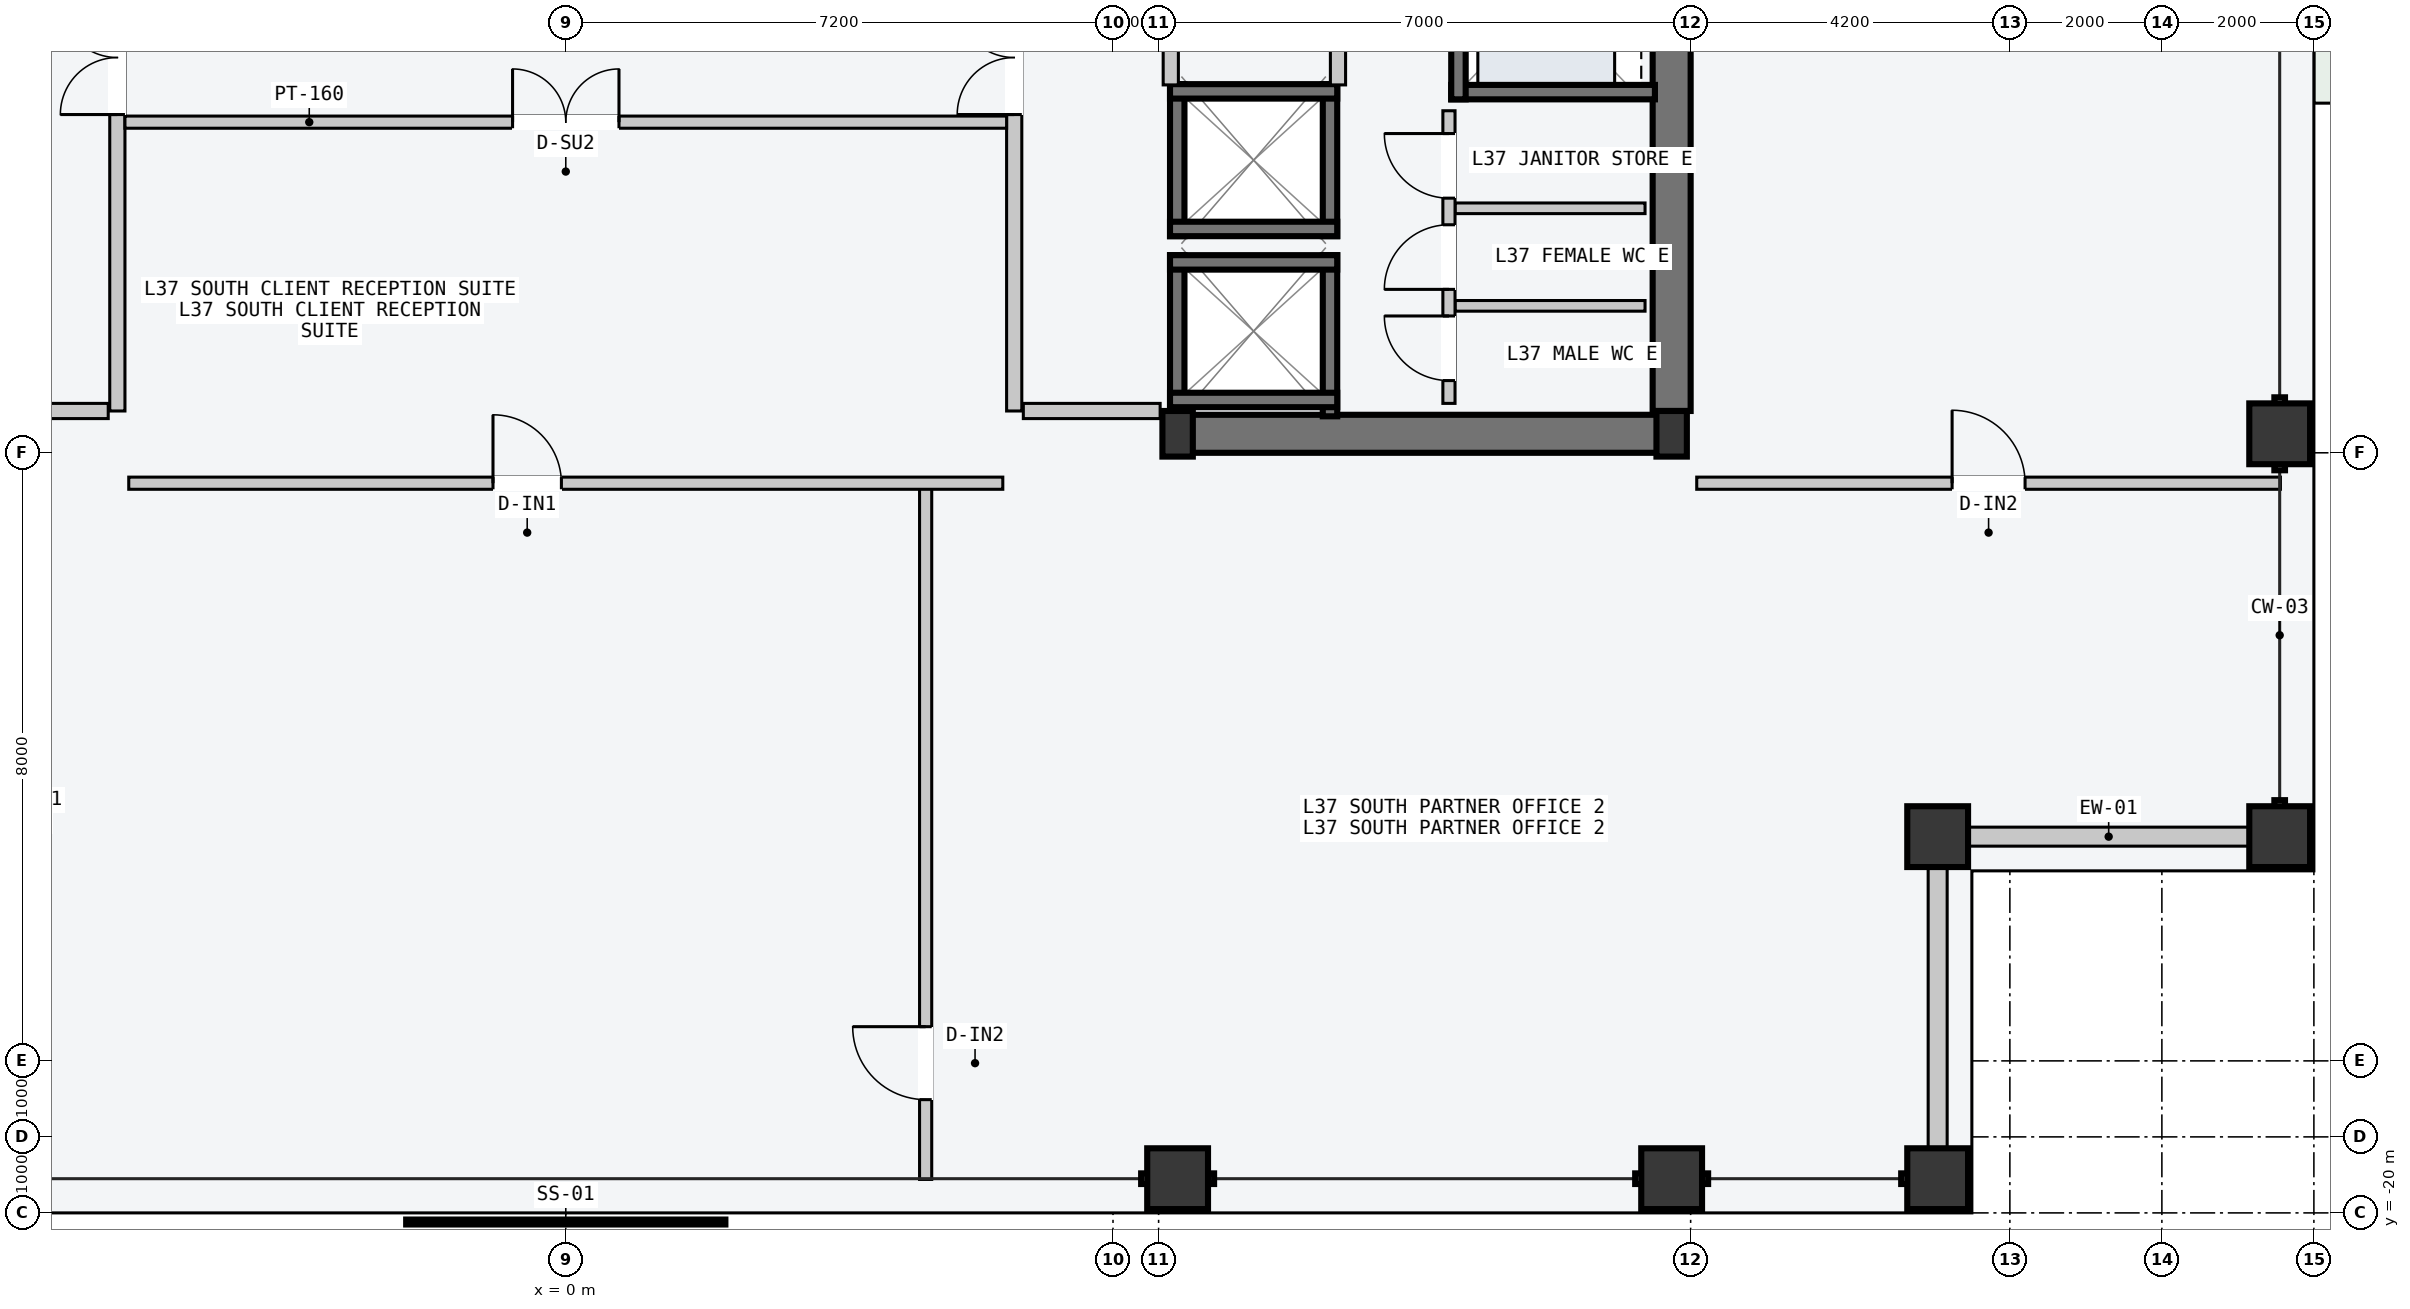
"""IFC4 building model, lengths in metres.
Left out: names, types, materials, properties, quantities, classifications, styles, units other than length and angle.
Written with IfcOpenShell. Run it as: python <this file> out.ifc"""

import sys

from ifc_helpers import new_model, si_unit, direction, frame, frame_2d, origin, origin_2d, place, context, subcontext, project, spatial, rectangle, hollow_rectangle, i_section, extrude, element, fill, save


model = new_model("IFC4")
c1 = context("Model", 3, precision=1e-05, world=origin(), true_north=direction((0.0, 1.0)))
c2 = subcontext(c1, "Body", "Model", "MODEL_VIEW")
j1 = project(units=[si_unit("LENGTHUNIT", "METRE"), si_unit("PLANEANGLEUNIT", "RADIAN")], contexts=[c1])
p1 = place(None, origin())
s1 = spatial("IfcSite", under=j1, at=p1, CompositionType="ELEMENT")
p2 = place(p1, origin())
s2 = spatial("IfcBuilding", under=s1, at=p2, CompositionType="ELEMENT")
p3 = place(p2, frame((0.0, 0.0, 142.2)))
s3 = spatial("IfcBuildingStorey", under=s2, at=p3, CompositionType="ELEMENT", Elevation=142.2)
p4 = place(p3, frame((8.07, -9.75, -0.2), z_axis=(0.0, 0.0, 1.0), x_axis=(1.0, 0.0, 0.0)))
e1 = element("IfcWall", 1, at=p4, inside=s3, PredefinedType="SHEAR", context=c2, shape_type="SweptSolid", body=[
    extrude(rectangle(XDim=6.46, YDim=0.5, at=frame_2d((3.23, 0.0))), origin(), (0.0, 0.0, 1.0), 3.6),
])
p5 = place(p3, frame((14.55, -9.45, -0.2), z_axis=(0.0, 0.0, 1.0), x_axis=(0.0, 1.0, 0.0)))
e2 = element("IfcWall", 2, at=p5, inside=s3, PredefinedType="SHEAR", context=c2, shape_type="SweptSolid", body=[
    extrude(rectangle(XDim=9.15, YDim=0.5, at=frame_2d((4.575, 0.0))), origin(), (0.0, 0.0, 1.0), 3.6),
])
for number, where, z_axis, x_axis in (
    (3, (8.05, -9.75, 0.0), (0.0, 0.0, 1.0), (1.0, 0.0, 0.0)),
    (4, (14.55, -9.75, 0.0), (0.0, 0.0, 1.0), (1.0, 0.0, 0.0)),
):
    element("IfcColumn", number, at=place(p3, frame(where, z_axis=z_axis, x_axis=x_axis)), inside=s3, PredefinedType="COLUMN", context=c2, shape_type="SweptSolid", body=[
        extrude(i_section(OverallWidth=0.4, OverallDepth=0.6, WebThickness=0.022, FlangeThickness=0.036, at=origin_2d()), origin(), (0.0, 0.0, 1.0), 3.6),
    ])
for number, where, z_axis, x_axis in (
    (5, (8.05, -19.55, 0.0), (0.0, 0.0, 1.0), (1.0, 0.0, 0.0)),
    (6, (14.55, -19.55, 0.0), (0.0, 0.0, 1.0), (1.0, 0.0, 0.0)),
    (7, (18.05, -19.55, 0.0), (0.0, 0.0, 1.0), (1.0, 0.0, 0.0)),
    (8, (22.55, -15.05, 0.0), (0.0, 0.0, 1.0), (0.0, 1.0, 0.0)),
    (9, (22.55, -9.75, 0.0), (0.0, 0.0, 1.0), (0.0, 1.0, 0.0)),
    (10, (18.05, -15.05, 0.0), (0.0, 0.0, 1.0), (1.0, 0.0, 0.0)),
):
    element("IfcColumn", number, at=place(p3, frame(where, z_axis=z_axis, x_axis=x_axis)), inside=s3, PredefinedType="COLUMN", context=c2, shape_type="SweptSolid", body=[
        extrude(hollow_rectangle(XDim=0.8, YDim=0.8, WallThickness=0.036, at=origin_2d()), origin(), (0.0, 0.0, 1.0), 3.6),
    ])
for number, where, z_axis, x_axis in (
    (11, (18.46, -15.05, 0.0), (0.0, 0.0, 1.0), (1.0, 0.0, 0.0)),
    (12, (18.05, -19.14, 0.0), (0.0, 0.0, 1.0), (0.0, 1.0, 0.0)),
):
    element("IfcWall", number, at=place(p3, frame(where, z_axis=z_axis, x_axis=x_axis)), inside=s3, PredefinedType="STANDARD", context=c2, shape_type="SweptSolid", body=[
        extrude(rectangle(XDim=3.68, YDim=0.25, at=frame_2d((1.84, 0.0))), origin(), (0.0, 0.0, 1.0), 2.75),
    ])
for number, where, z_axis, x_axis in (
    (13, (8.045, -9.52, -0.2), (0.0, 0.0, 1.0), (0.0, 1.0, 0.0)),
    (14, (10.055, -9.52, -0.2), (0.0, 0.0, 1.0), (0.0, 1.0, 0.0)),
):
    element("IfcWall", number, at=place(p3, frame(where, z_axis=z_axis, x_axis=x_axis)), inside=s3, PredefinedType="SOLIDWALL", context=c2, shape_type="SweptSolid", body=[
        extrude(rectangle(XDim=2.12, YDim=0.19, at=frame_2d((1.06, 0.0))), origin(), (0.0, 0.0, 1.0), 3.6),
    ])
for number, where, z_axis, x_axis in (
    (15, (7.95, -7.495, -0.2), (0.0, 0.0, 1.0), (1.0, 0.0, 0.0)),
    (16, (7.95, -9.305, -0.2), (0.0, 0.0, 1.0), (1.0, 0.0, 0.0)),
):
    element("IfcWall", number, at=place(p3, frame(where, z_axis=z_axis, x_axis=x_axis)), inside=s3, PredefinedType="SOLIDWALL", context=c2, shape_type="SweptSolid", body=[
        extrude(rectangle(XDim=2.2, YDim=0.19, at=frame_2d((1.1, 0.0))), origin(), (0.0, 0.0, 1.0), 3.6),
    ])
for number, where, z_axis, x_axis in (
    (17, (8.045, -7.15, -0.2), (0.0, 0.0, 1.0), (0.0, 1.0, 0.0)),
    (18, (10.055, -7.15, -0.2), (0.0, 0.0, 1.0), (0.0, 1.0, 0.0)),
):
    element("IfcWall", number, at=place(p3, frame(where, z_axis=z_axis, x_axis=x_axis)), inside=s3, PredefinedType="SOLIDWALL", context=c2, shape_type="SweptSolid", body=[
        extrude(rectangle(XDim=2.0, YDim=0.19, at=frame_2d((1.0, 0.0))), origin(), (0.0, 0.0, 1.0), 3.6),
    ])
for number, where, z_axis, x_axis in (
    (19, (7.95, -5.245, -0.2), (0.0, 0.0, 1.0), (1.0, 0.0, 0.0)),
    (20, (7.95, -7.055, -0.2), (0.0, 0.0, 1.0), (1.0, 0.0, 0.0)),
):
    element("IfcWall", number, at=place(p3, frame(where, z_axis=z_axis, x_axis=x_axis)), inside=s3, PredefinedType="SOLIDWALL", context=c2, shape_type="SweptSolid", body=[
        extrude(rectangle(XDim=2.2, YDim=0.19, at=frame_2d((1.1, 0.0))), origin(), (0.0, 0.0, 1.0), 3.6),
    ])
p6 = place(p3, frame((11.65, -5.255, -0.2), z_axis=(0.0, 0.0, 1.0), x_axis=(1.0, 0.0, 0.0)))
e21 = element("IfcWall", 21, at=p6, inside=s3, PredefinedType="SOLIDWALL", context=c2, shape_type="SweptSolid", body=[
    extrude(rectangle(XDim=2.68, YDim=0.19, at=frame_2d((1.34, 0.0))), origin(), (0.0, 0.0, 1.0), 3.6),
])
p7 = place(p3, frame((11.745, -5.35, -0.2), z_axis=(0.0, 0.0, 1.0), x_axis=(0.0, 1.0, 0.0)))
e22 = element("IfcWall", 22, at=p7, inside=s3, PredefinedType="SOLIDWALL", context=c2, shape_type="SweptSolid", body=[
    extrude(rectangle(XDim=2.6, YDim=0.19, at=frame_2d((1.3, 0.0))), origin(), (0.0, 0.0, 1.0), 3.6),
])
p8 = place(p3, frame((-5.9, -9.45, 0.0), z_axis=(0.0, 0.0, 1.0), x_axis=(0.0, 1.0, 0.0)))
e23 = element("IfcWall", 23, at=p8, inside=s3, PredefinedType="PARTITIONING", context=c2, shape_type="SweptSolid", body=[
    extrude(rectangle(XDim=10.5, YDim=0.2, at=frame_2d((5.25, 0.0))), origin(), (0.0, 0.0, 1.0), 3.4),
])
p9 = place(p8, frame((3.9, 0.0, 0.0)))
e24 = element("IfcOpeningElement", 24, at=p9, cuts=e23, PredefinedType="OPENING", context=c2, shape_type="SweptSolid", body=[
    extrude(rectangle(XDim=1.5, YDim=2.2, at=frame_2d((0.75, 1.1))), frame((0.0, 0.11, 0.0), z_axis=(0.0, -1.0, 0.0), x_axis=(1.0, 0.0, 0.0)), (0.0, 0.0, 1.0), 0.22),
])
p10 = place(p3, frame((-6.02, -9.45, 0.0), z_axis=(0.0, 0.0, 1.0), x_axis=(-1.0, 0.0, 0.0)))
e25 = element("IfcWall", 25, at=p10, inside=s3, PredefinedType="PARTITIONING", context=c2, shape_type="SweptSolid", body=[
    extrude(rectangle(XDim=1.8, YDim=0.2, at=frame_2d((0.9, 0.0))), origin(), (0.0, 0.0, 1.0), 3.4),
])
p11 = place(p3, frame((5.9, -9.45, 0.0), z_axis=(0.0, 0.0, 1.0), x_axis=(0.0, 1.0, 0.0)))
e26 = element("IfcWall", 26, at=p11, inside=s3, PredefinedType="PARTITIONING", context=c2, shape_type="SweptSolid", body=[
    extrude(rectangle(XDim=18.9, YDim=0.2, at=frame_2d((9.45, 0.0))), origin(), (0.0, 0.0, 1.0), 3.4),
])
p12 = place(p11, frame((3.9, 0.0, 0.0)))
e27 = element("IfcOpeningElement", 27, at=p12, cuts=e26, PredefinedType="OPENING", context=c2, shape_type="SweptSolid", body=[
    extrude(rectangle(XDim=1.5, YDim=2.2, at=frame_2d((0.75, 1.1))), frame((0.0, 0.11, 0.0), z_axis=(0.0, -1.0, 0.0), x_axis=(1.0, 0.0, 0.0)), (0.0, 0.0, 1.0), 0.22),
])
p13 = place(p3, frame((6.02, -9.45, 0.0), z_axis=(0.0, 0.0, 1.0), x_axis=(1.0, 0.0, 0.0)))
e28 = element("IfcWall", 28, at=p13, inside=s3, PredefinedType="PARTITIONING", context=c2, shape_type="SweptSolid", body=[
    extrude(rectangle(XDim=1.8, YDim=0.2, at=frame_2d((0.9, 0.0))), origin(), (0.0, 0.0, 1.0), 3.4),
])
for number, where, z_axis, x_axis in (
    (29, (7.96, -5.16, 0.0), (0.0, 0.0, 1.0), (0.0, 1.0, 0.0)),
    (30, (10.16, -5.16, 0.0), (0.0, 0.0, 1.0), (0.0, 1.0, 0.0)),
):
    element("IfcWall", number, at=place(p3, frame(where, z_axis=z_axis, x_axis=x_axis)), inside=s3, PredefinedType="PARTITIONING", context=c2, shape_type="SweptSolid", body=[
        extrude(rectangle(XDim=2.44, YDim=0.2, at=frame_2d((1.22, 0.0))), origin(), (0.0, 0.0, 1.0), 3.4),
    ])
for number, where, z_axis, x_axis in (
    (31, (11.7, -8.067, 0.0), (0.0, 0.0, 1.0), (1.0, 0.0, 0.0)),
    (32, (11.7, -6.783, 0.0), (0.0, 0.0, 1.0), (1.0, 0.0, 0.0)),
):
    element("IfcWall", number, at=place(p3, frame(where, z_axis=z_axis, x_axis=x_axis)), inside=s3, PredefinedType="PARTITIONING", context=c2, shape_type="SweptSolid", body=[
        extrude(rectangle(XDim=2.5, YDim=0.14, at=frame_2d((1.25, 0.0))), origin(), (0.0, 0.0, 1.0), 3.4),
    ])
p14 = place(p3, frame((11.62, -9.35, 0.0), z_axis=(0.0, 0.0, 1.0), x_axis=(0.0, 1.0, 0.0)))
e33 = element("IfcWall", 33, at=p14, inside=s3, PredefinedType="PARTITIONING", context=c2, shape_type="SweptSolid", body=[
    extrude(rectangle(XDim=3.85, YDim=0.16, at=frame_2d((1.925, 0.0))), origin(), (0.0, 0.0, 1.0), 3.4),
])
p15 = place(p14, frame((0.3, 0.0, 0.0)))
e34 = element("IfcOpeningElement", 34, at=p15, cuts=e33, PredefinedType="OPENING", context=c2, shape_type="SweptSolid", body=[
    extrude(rectangle(XDim=0.85, YDim=2.12, at=frame_2d((0.425, 1.06))), frame((0.0, 0.09, 0.0), z_axis=(0.0, -1.0, 0.0), x_axis=(1.0, 0.0, 0.0)), (0.0, 0.0, 1.0), 0.18),
])
p16 = place(p14, frame((1.5, 0.0, 0.0)))
e35 = element("IfcOpeningElement", 35, at=p16, cuts=e33, PredefinedType="OPENING", context=c2, shape_type="SweptSolid", body=[
    extrude(rectangle(XDim=0.85, YDim=2.12, at=frame_2d((0.425, 1.06))), frame((0.0, 0.09, 0.0), z_axis=(0.0, -1.0, 0.0), x_axis=(1.0, 0.0, 0.0)), (0.0, 0.0, 1.0), 0.18),
])
p17 = place(p14, frame((2.7, 0.0, 0.0)))
e36 = element("IfcOpeningElement", 36, at=p17, cuts=e33, PredefinedType="OPENING", context=c2, shape_type="SweptSolid", body=[
    extrude(rectangle(XDim=0.85, YDim=2.12, at=frame_2d((0.425, 1.06))), frame((0.0, 0.09, 0.0), z_axis=(0.0, -1.0, 0.0), x_axis=(1.0, 0.0, 0.0)), (0.0, 0.0, 1.0), 0.18),
])
p18 = place(p3, frame((-5.8, -5.65, 0.0), z_axis=(0.0, 0.0, 1.0), x_axis=(1.0, 0.0, 0.0)))
e37 = element("IfcWall", 37, at=p18, inside=s3, PredefinedType="PARTITIONING", context=c2, shape_type="SweptSolid", body=[
    extrude(rectangle(XDim=11.6, YDim=0.16, at=frame_2d((5.8, 0.0))), origin(), (0.0, 0.0, 1.0), 3.4),
])
p19 = place(p18, frame((5.1, 0.0, 0.0)))
e38 = element("IfcOpeningElement", 38, at=p19, cuts=e37, PredefinedType="OPENING", context=c2, shape_type="SweptSolid", body=[
    extrude(rectangle(XDim=1.4, YDim=2.2, at=frame_2d((0.7, 1.1))), frame((0.0, 0.09, 0.0), z_axis=(0.0, -1.0, 0.0), x_axis=(1.0, 0.0, 0.0)), (0.0, 0.0, 1.0), 0.18),
])
p20 = place(p3, frame((4.735, -19.56, 0.0), z_axis=(0.0, 0.0, 1.0), x_axis=(0.0, 1.0, 0.0)))
e39 = element("IfcWall", 39, at=p20, inside=s3, PredefinedType="PARTITIONING", context=c2, shape_type="SweptSolid", body=[
    extrude(rectangle(XDim=9.1, YDim=0.16, at=frame_2d((4.55, 0.0))), origin(), (0.0, 0.0, 1.0), 3.4),
])
p21 = place(p20, frame((1.05, 0.0, 0.0)))
e40 = element("IfcOpeningElement", 40, at=p21, cuts=e39, PredefinedType="OPENING", context=c2, shape_type="SweptSolid", body=[
    extrude(rectangle(XDim=0.96, YDim=2.18, at=frame_2d((0.48, 1.09))), frame((0.0, 0.09, 0.0), z_axis=(0.0, -1.0, 0.0), x_axis=(1.0, 0.0, 0.0)), (0.0, 0.0, 1.0), 0.18),
])
p22 = place(p3, frame((-5.75, -10.4, 0.0), z_axis=(0.0, 0.0, 1.0), x_axis=(1.0, 0.0, 0.0)))
e41 = element("IfcWall", 41, at=p22, inside=s3, PredefinedType="PARTITIONING", context=c2, shape_type="SweptSolid", body=[
    extrude(rectangle(XDim=11.5, YDim=0.16, at=frame_2d((5.75, 0.0))), origin(), (0.0, 0.0, 1.0), 3.4),
])
p23 = place(p22, frame((4.792, 0.0, 0.0)))
e42 = element("IfcOpeningElement", 42, at=p23, cuts=e41, PredefinedType="OPENING", context=c2, shape_type="SweptSolid", body=[
    extrude(rectangle(XDim=0.9, YDim=2.15, at=frame_2d((0.45, 1.075))), frame((0.0, 0.09, 0.0), z_axis=(0.0, -1.0, 0.0), x_axis=(1.0, 0.0, 0.0)), (0.0, 0.0, 1.0), 0.18),
])
p24 = place(p3, frame((14.88, -10.4, 0.0), z_axis=(0.0, 0.0, 1.0), x_axis=(1.0, 0.0, 0.0)))
e43 = element("IfcWall", 43, at=p24, inside=s3, PredefinedType="PARTITIONING", context=c2, shape_type="SweptSolid", body=[
    extrude(rectangle(XDim=7.68, YDim=0.16, at=frame_2d((3.84, 0.0))), origin(), (0.0, 0.0, 1.0), 3.4),
])
p25 = place(p24, frame((3.36, 0.0, 0.0)))
e44 = element("IfcOpeningElement", 44, at=p25, cuts=e43, PredefinedType="OPENING", context=c2, shape_type="SweptSolid", body=[
    extrude(rectangle(XDim=0.96, YDim=2.18, at=frame_2d((0.48, 1.09))), frame((0.0, 0.09, 0.0), z_axis=(0.0, -1.0, 0.0), x_axis=(1.0, 0.0, 0.0)), (0.0, 0.0, 1.0), 0.18),
])
p26 = place(p9, origin())
e45 = element("IfcDoor", 45, at=p26, inside=s3, OperationType="DOUBLE_DOOR_SINGLE_SWING", PredefinedType="DOOR", context=c2, shape_type="SweptSolid", body=[
    extrude(rectangle(XDim=1.5, YDim=2.2, at=frame_2d((0.75, 1.1))), frame((0.0, 0.025, 0.0), z_axis=(0.0, -1.0, 0.0), x_axis=(1.0, 0.0, 0.0)), (0.0, 0.0, 1.0), 0.05),
])
fill(e24, e45)
p27 = place(p12, origin())
e46 = element("IfcDoor", 46, at=p27, inside=s3, OperationType="DOUBLE_DOOR_SINGLE_SWING", PredefinedType="DOOR", context=c2, shape_type="SweptSolid", body=[
    extrude(rectangle(XDim=1.5, YDim=2.2, at=frame_2d((0.75, 1.1))), frame((0.0, 0.025, 0.0), z_axis=(0.0, -1.0, 0.0), x_axis=(1.0, 0.0, 0.0)), (0.0, 0.0, 1.0), 0.05),
])
fill(e27, e46)
p28 = place(p15, origin())
e47 = element("IfcDoor", 47, at=p28, inside=s3, OperationType="SINGLE_SWING_RIGHT", PredefinedType="DOOR", context=c2, shape_type="SweptSolid", body=[
    extrude(rectangle(XDim=0.85, YDim=2.12, at=frame_2d((0.425, 1.06))), frame((0.0, 0.025, 0.0), z_axis=(0.0, -1.0, 0.0), x_axis=(1.0, 0.0, 0.0)), (0.0, 0.0, 1.0), 0.05),
])
fill(e34, e47)
p29 = place(p16, origin())
e48 = element("IfcDoor", 48, at=p29, inside=s3, OperationType="SINGLE_SWING_LEFT", PredefinedType="DOOR", context=c2, shape_type="SweptSolid", body=[
    extrude(rectangle(XDim=0.85, YDim=2.12, at=frame_2d((0.425, 1.06))), frame((0.0, 0.025, 0.0), z_axis=(0.0, -1.0, 0.0), x_axis=(1.0, 0.0, 0.0)), (0.0, 0.0, 1.0), 0.05),
])
fill(e35, e48)
p30 = place(p17, origin())
e49 = element("IfcDoor", 49, at=p30, inside=s3, OperationType="SINGLE_SWING_RIGHT", PredefinedType="DOOR", context=c2, shape_type="SweptSolid", body=[
    extrude(rectangle(XDim=0.85, YDim=2.12, at=frame_2d((0.425, 1.06))), frame((0.0, 0.025, 0.0), z_axis=(0.0, -1.0, 0.0), x_axis=(1.0, 0.0, 0.0)), (0.0, 0.0, 1.0), 0.05),
])
fill(e36, e49)
p31 = place(p19, origin())
e50 = element("IfcDoor", 50, at=p31, inside=s3, OperationType="DOUBLE_DOOR_SINGLE_SWING", PredefinedType="DOOR", context=c2, shape_type="SweptSolid", body=[
    extrude(rectangle(XDim=1.4, YDim=2.2, at=frame_2d((0.7, 1.1))), frame((0.0, 0.025, 0.0), z_axis=(0.0, -1.0, 0.0), x_axis=(1.0, 0.0, 0.0)), (0.0, 0.0, 1.0), 0.05),
])
fill(e38, e50)
p32 = place(p21, origin())
e51 = element("IfcDoor", 51, at=p32, inside=s3, OperationType="SINGLE_SWING_RIGHT", PredefinedType="DOOR", context=c2, shape_type="SweptSolid", body=[
    extrude(rectangle(XDim=0.96, YDim=2.18, at=frame_2d((0.48, 1.09))), frame((0.0, 0.025, 0.0), z_axis=(0.0, -1.0, 0.0), x_axis=(1.0, 0.0, 0.0)), (0.0, 0.0, 1.0), 0.05),
])
fill(e40, e51)
p33 = place(p23, origin())
e52 = element("IfcDoor", 52, at=p33, inside=s3, OperationType="SINGLE_SWING_LEFT", PredefinedType="DOOR", context=c2, shape_type="SweptSolid", body=[
    extrude(rectangle(XDim=0.9, YDim=2.15, at=frame_2d((0.45, 1.075))), frame((0.0, 0.025, 0.0), z_axis=(0.0, -1.0, 0.0), x_axis=(1.0, 0.0, 0.0)), (0.0, 0.0, 1.0), 0.05),
])
fill(e42, e52)
p34 = place(p25, origin())
e53 = element("IfcDoor", 53, at=p34, inside=s3, OperationType="SINGLE_SWING_LEFT", PredefinedType="DOOR", context=c2, shape_type="SweptSolid", body=[
    extrude(rectangle(XDim=0.96, YDim=2.18, at=frame_2d((0.48, 1.09))), frame((0.0, 0.025, 0.0), z_axis=(0.0, -1.0, 0.0), x_axis=(1.0, 0.0, 0.0)), (0.0, 0.0, 1.0), 0.05),
])
fill(e44, e53)
save(model, sys.argv[1])
